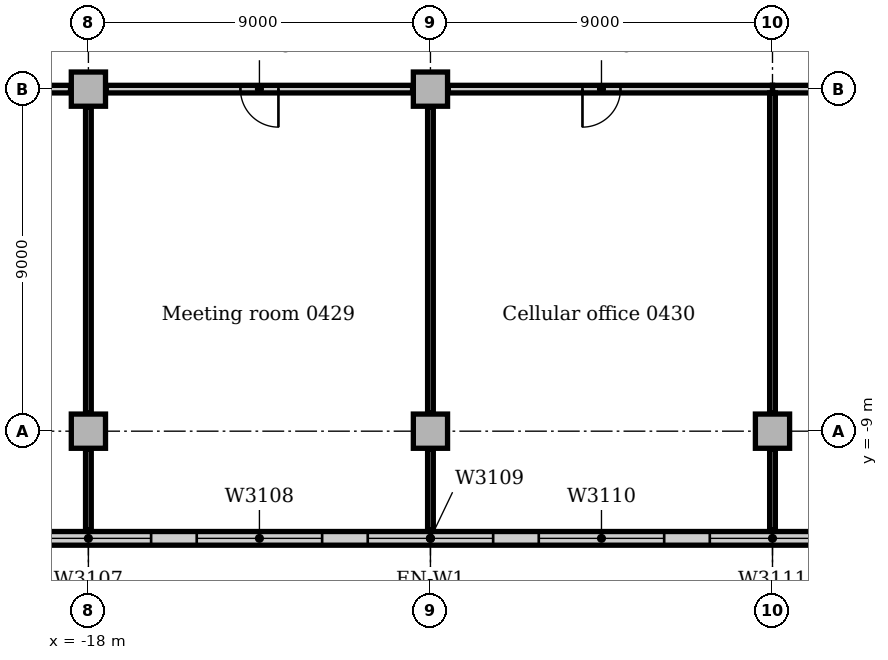
"""IFC4 building model, lengths in metres.
Left out: names, types, materials, properties, quantities, classifications, styles, units other than length and angle.
Written with IfcOpenShell. Run it as: python <this file> out.ifc"""

import sys

from ifc_helpers import new_model, si_unit, direction, frame, frame_2d, origin, origin_with_axes, origin_2d, place, context, subcontext, project, spatial, rectangle, extrude, element, fill, save


model = new_model("IFC4")
c1 = context("Model", 3, precision=1e-05, world=origin(), true_north=direction((0.0, 1.0)))
c2 = subcontext(c1, "Body", "Model", "MODEL_VIEW")
j1 = project(units=[si_unit("LENGTHUNIT", "METRE"), si_unit("PLANEANGLEUNIT", "RADIAN")], contexts=[c1])
p1 = place(None, origin())
s1 = spatial("IfcSite", under=j1, at=p1, CompositionType="ELEMENT")
p2 = place(p1, origin())
s2 = spatial("IfcBuilding", under=s1, at=p2, CompositionType="ELEMENT")
p3 = place(p2, frame((0.0, 0.0, 21.0)))
s3 = spatial("IfcBuildingStorey", under=s2, at=p3, CompositionType="ELEMENT", Elevation=21.0)
for number, where, z_axis, x_axis in (
    (1, (-18.0, -9.0, 0.0), (0.0, 0.0, 1.0), (1.0, 0.0, 0.0)),
    (2, (-18.0, 0.0, 0.0), (0.0, 0.0, 1.0), (1.0, 0.0, 0.0)),
    (3, (-9.0, -9.0, 0.0), (0.0, 0.0, 1.0), (1.0, 0.0, 0.0)),
    (4, (-9.0, 0.0, 0.0), (0.0, 0.0, 1.0), (1.0, 0.0, 0.0)),
    (5, (0.0, -9.0, 0.0), (0.0, 0.0, 1.0), (1.0, 0.0, 0.0)),
):
    element("IfcColumn", number, at=place(p3, frame(where, z_axis=z_axis, x_axis=x_axis)), inside=s3, PredefinedType="COLUMN", context=c2, shape_type="SweptSolid", body=[
        extrude(rectangle(XDim=0.9, YDim=0.9, at=origin_2d()), origin(), (0.0, 0.0, 1.0), 4.7),
    ])
p4 = place(p3, frame((-81.0, -11.82, 0.0), z_axis=(0.0, 0.0, 1.0), x_axis=(1.0, 0.0, 0.0)))
e6 = element("IfcWall", 6, at=p4, inside=s3, PredefinedType="STANDARD", context=c2, shape_type="SweptSolid", body=[
    extrude(rectangle(XDim=144.0, YDim=0.36, at=frame_2d((72.0, 0.0))), origin(), (0.0, 0.0, 1.0), 4.85),
])
p5 = place(p4, frame((2.85, 0.0, 0.9)))
e7 = element("IfcOpeningElement", 7, at=p5, cuts=e6, PredefinedType="OPENING", context=c2, shape_type="SweptSolid", body=[
    extrude(rectangle(XDim=3.3, YDim=2.4, at=frame_2d((1.65, 1.2))), frame((0.0, 0.19, 0.0), z_axis=(0.0, -1.0, 0.0), x_axis=(1.0, 0.0, 0.0)), (0.0, 0.0, 1.0), 0.38),
])
p6 = place(p4, frame((7.35, 0.0, 0.9)))
e8 = element("IfcOpeningElement", 8, at=p6, cuts=e6, PredefinedType="OPENING", context=c2, shape_type="SweptSolid", body=[
    extrude(rectangle(XDim=3.3, YDim=2.4, at=frame_2d((1.65, 1.2))), frame((0.0, 0.19, 0.0), z_axis=(0.0, -1.0, 0.0), x_axis=(1.0, 0.0, 0.0)), (0.0, 0.0, 1.0), 0.38),
])
p7 = place(p4, frame((11.85, 0.0, 0.9)))
e9 = element("IfcOpeningElement", 9, at=p7, cuts=e6, PredefinedType="OPENING", context=c2, shape_type="SweptSolid", body=[
    extrude(rectangle(XDim=3.3, YDim=2.4, at=frame_2d((1.65, 1.2))), frame((0.0, 0.19, 0.0), z_axis=(0.0, -1.0, 0.0), x_axis=(1.0, 0.0, 0.0)), (0.0, 0.0, 1.0), 0.38),
])
p8 = place(p4, frame((16.35, 0.0, 0.9)))
e10 = element("IfcOpeningElement", 10, at=p8, cuts=e6, PredefinedType="OPENING", context=c2, shape_type="SweptSolid", body=[
    extrude(rectangle(XDim=3.3, YDim=2.4, at=frame_2d((1.65, 1.2))), frame((0.0, 0.19, 0.0), z_axis=(0.0, -1.0, 0.0), x_axis=(1.0, 0.0, 0.0)), (0.0, 0.0, 1.0), 0.38),
])
p9 = place(p4, frame((20.85, 0.0, 0.9)))
e11 = element("IfcOpeningElement", 11, at=p9, cuts=e6, PredefinedType="OPENING", context=c2, shape_type="SweptSolid", body=[
    extrude(rectangle(XDim=3.3, YDim=2.4, at=frame_2d((1.65, 1.2))), frame((0.0, 0.19, 0.0), z_axis=(0.0, -1.0, 0.0), x_axis=(1.0, 0.0, 0.0)), (0.0, 0.0, 1.0), 0.38),
])
p10 = place(p4, frame((25.35, 0.0, 0.9)))
e12 = element("IfcOpeningElement", 12, at=p10, cuts=e6, PredefinedType="OPENING", context=c2, shape_type="SweptSolid", body=[
    extrude(rectangle(XDim=3.3, YDim=2.4, at=frame_2d((1.65, 1.2))), frame((0.0, 0.19, 0.0), z_axis=(0.0, -1.0, 0.0), x_axis=(1.0, 0.0, 0.0)), (0.0, 0.0, 1.0), 0.38),
])
p11 = place(p4, frame((29.85, 0.0, 0.9)))
e13 = element("IfcOpeningElement", 13, at=p11, cuts=e6, PredefinedType="OPENING", context=c2, shape_type="SweptSolid", body=[
    extrude(rectangle(XDim=3.3, YDim=2.4, at=frame_2d((1.65, 1.2))), frame((0.0, 0.19, 0.0), z_axis=(0.0, -1.0, 0.0), x_axis=(1.0, 0.0, 0.0)), (0.0, 0.0, 1.0), 0.38),
])
p12 = place(p4, frame((34.35, 0.0, 0.9)))
e14 = element("IfcOpeningElement", 14, at=p12, cuts=e6, PredefinedType="OPENING", context=c2, shape_type="SweptSolid", body=[
    extrude(rectangle(XDim=3.3, YDim=2.4, at=frame_2d((1.65, 1.2))), frame((0.0, 0.19, 0.0), z_axis=(0.0, -1.0, 0.0), x_axis=(1.0, 0.0, 0.0)), (0.0, 0.0, 1.0), 0.38),
])
p13 = place(p4, frame((38.85, 0.0, 0.9)))
e15 = element("IfcOpeningElement", 15, at=p13, cuts=e6, PredefinedType="OPENING", context=c2, shape_type="SweptSolid", body=[
    extrude(rectangle(XDim=3.3, YDim=2.4, at=frame_2d((1.65, 1.2))), frame((0.0, 0.19, 0.0), z_axis=(0.0, -1.0, 0.0), x_axis=(1.0, 0.0, 0.0)), (0.0, 0.0, 1.0), 0.38),
])
p14 = place(p4, frame((43.35, 0.0, 0.9)))
e16 = element("IfcOpeningElement", 16, at=p14, cuts=e6, PredefinedType="OPENING", context=c2, shape_type="SweptSolid", body=[
    extrude(rectangle(XDim=3.3, YDim=2.4, at=frame_2d((1.65, 1.2))), frame((0.0, 0.19, 0.0), z_axis=(0.0, -1.0, 0.0), x_axis=(1.0, 0.0, 0.0)), (0.0, 0.0, 1.0), 0.38),
])
p15 = place(p4, frame((47.85, 0.0, 0.9)))
e17 = element("IfcOpeningElement", 17, at=p15, cuts=e6, PredefinedType="OPENING", context=c2, shape_type="SweptSolid", body=[
    extrude(rectangle(XDim=3.3, YDim=2.4, at=frame_2d((1.65, 1.2))), frame((0.0, 0.19, 0.0), z_axis=(0.0, -1.0, 0.0), x_axis=(1.0, 0.0, 0.0)), (0.0, 0.0, 1.0), 0.38),
])
p16 = place(p4, frame((52.35, 0.0, 0.9)))
e18 = element("IfcOpeningElement", 18, at=p16, cuts=e6, PredefinedType="OPENING", context=c2, shape_type="SweptSolid", body=[
    extrude(rectangle(XDim=3.3, YDim=2.4, at=frame_2d((1.65, 1.2))), frame((0.0, 0.19, 0.0), z_axis=(0.0, -1.0, 0.0), x_axis=(1.0, 0.0, 0.0)), (0.0, 0.0, 1.0), 0.38),
])
p17 = place(p4, frame((56.85, 0.0, 0.9)))
e19 = element("IfcOpeningElement", 19, at=p17, cuts=e6, PredefinedType="OPENING", context=c2, shape_type="SweptSolid", body=[
    extrude(rectangle(XDim=3.3, YDim=2.4, at=frame_2d((1.65, 1.2))), frame((0.0, 0.19, 0.0), z_axis=(0.0, -1.0, 0.0), x_axis=(1.0, 0.0, 0.0)), (0.0, 0.0, 1.0), 0.38),
])
p18 = place(p4, frame((61.35, 0.0, 0.9)))
e20 = element("IfcOpeningElement", 20, at=p18, cuts=e6, PredefinedType="OPENING", context=c2, shape_type="SweptSolid", body=[
    extrude(rectangle(XDim=3.3, YDim=2.4, at=frame_2d((1.65, 1.2))), frame((0.0, 0.19, 0.0), z_axis=(0.0, -1.0, 0.0), x_axis=(1.0, 0.0, 0.0)), (0.0, 0.0, 1.0), 0.38),
])
p19 = place(p4, frame((65.85, 0.0, 0.9)))
e21 = element("IfcOpeningElement", 21, at=p19, cuts=e6, PredefinedType="OPENING", context=c2, shape_type="SweptSolid", body=[
    extrude(rectangle(XDim=3.3, YDim=2.4, at=frame_2d((1.65, 1.2))), frame((0.0, 0.19, 0.0), z_axis=(0.0, -1.0, 0.0), x_axis=(1.0, 0.0, 0.0)), (0.0, 0.0, 1.0), 0.38),
])
p20 = place(p4, frame((70.35, 0.0, 0.9)))
e22 = element("IfcOpeningElement", 22, at=p20, cuts=e6, PredefinedType="OPENING", context=c2, shape_type="SweptSolid", body=[
    extrude(rectangle(XDim=3.3, YDim=2.4, at=frame_2d((1.65, 1.2))), frame((0.0, 0.19, 0.0), z_axis=(0.0, -1.0, 0.0), x_axis=(1.0, 0.0, 0.0)), (0.0, 0.0, 1.0), 0.38),
])
p21 = place(p4, frame((74.85, 0.0, 0.9)))
e23 = element("IfcOpeningElement", 23, at=p21, cuts=e6, PredefinedType="OPENING", context=c2, shape_type="SweptSolid", body=[
    extrude(rectangle(XDim=3.3, YDim=2.4, at=frame_2d((1.65, 1.2))), frame((0.0, 0.19, 0.0), z_axis=(0.0, -1.0, 0.0), x_axis=(1.0, 0.0, 0.0)), (0.0, 0.0, 1.0), 0.38),
])
p22 = place(p4, frame((79.35, 0.0, 0.9)))
e24 = element("IfcOpeningElement", 24, at=p22, cuts=e6, PredefinedType="OPENING", context=c2, shape_type="SweptSolid", body=[
    extrude(rectangle(XDim=3.3, YDim=2.4, at=frame_2d((1.65, 1.2))), frame((0.0, 0.19, 0.0), z_axis=(0.0, -1.0, 0.0), x_axis=(1.0, 0.0, 0.0)), (0.0, 0.0, 1.0), 0.38),
])
p23 = place(p4, frame((83.85, 0.0, 0.9)))
e25 = element("IfcOpeningElement", 25, at=p23, cuts=e6, PredefinedType="OPENING", context=c2, shape_type="SweptSolid", body=[
    extrude(rectangle(XDim=3.3, YDim=2.4, at=frame_2d((1.65, 1.2))), frame((0.0, 0.19, 0.0), z_axis=(0.0, -1.0, 0.0), x_axis=(1.0, 0.0, 0.0)), (0.0, 0.0, 1.0), 0.38),
])
p24 = place(p4, frame((88.35, 0.0, 0.9)))
e26 = element("IfcOpeningElement", 26, at=p24, cuts=e6, PredefinedType="OPENING", context=c2, shape_type="SweptSolid", body=[
    extrude(rectangle(XDim=3.3, YDim=2.4, at=frame_2d((1.65, 1.2))), frame((0.0, 0.19, 0.0), z_axis=(0.0, -1.0, 0.0), x_axis=(1.0, 0.0, 0.0)), (0.0, 0.0, 1.0), 0.38),
])
p25 = place(p4, frame((92.85, 0.0, 0.9)))
e27 = element("IfcOpeningElement", 27, at=p25, cuts=e6, PredefinedType="OPENING", context=c2, shape_type="SweptSolid", body=[
    extrude(rectangle(XDim=3.3, YDim=2.4, at=frame_2d((1.65, 1.2))), frame((0.0, 0.19, 0.0), z_axis=(0.0, -1.0, 0.0), x_axis=(1.0, 0.0, 0.0)), (0.0, 0.0, 1.0), 0.38),
])
p26 = place(p4, frame((97.35, 0.0, 0.9)))
e28 = element("IfcOpeningElement", 28, at=p26, cuts=e6, PredefinedType="OPENING", context=c2, shape_type="SweptSolid", body=[
    extrude(rectangle(XDim=3.3, YDim=2.4, at=frame_2d((1.65, 1.2))), frame((0.0, 0.19, 0.0), z_axis=(0.0, -1.0, 0.0), x_axis=(1.0, 0.0, 0.0)), (0.0, 0.0, 1.0), 0.38),
])
p27 = place(p4, frame((101.85, 0.0, 0.9)))
e29 = element("IfcOpeningElement", 29, at=p27, cuts=e6, PredefinedType="OPENING", context=c2, shape_type="SweptSolid", body=[
    extrude(rectangle(XDim=3.3, YDim=2.4, at=frame_2d((1.65, 1.2))), frame((0.0, 0.19, 0.0), z_axis=(0.0, -1.0, 0.0), x_axis=(1.0, 0.0, 0.0)), (0.0, 0.0, 1.0), 0.38),
])
p28 = place(p4, frame((106.35, 0.0, 0.9)))
e30 = element("IfcOpeningElement", 30, at=p28, cuts=e6, PredefinedType="OPENING", context=c2, shape_type="SweptSolid", body=[
    extrude(rectangle(XDim=3.3, YDim=2.4, at=frame_2d((1.65, 1.2))), frame((0.0, 0.19, 0.0), z_axis=(0.0, -1.0, 0.0), x_axis=(1.0, 0.0, 0.0)), (0.0, 0.0, 1.0), 0.38),
])
p29 = place(p4, frame((110.85, 0.0, 0.9)))
e31 = element("IfcOpeningElement", 31, at=p29, cuts=e6, PredefinedType="OPENING", context=c2, shape_type="SweptSolid", body=[
    extrude(rectangle(XDim=3.3, YDim=2.4, at=frame_2d((1.65, 1.2))), frame((0.0, 0.19, 0.0), z_axis=(0.0, -1.0, 0.0), x_axis=(1.0, 0.0, 0.0)), (0.0, 0.0, 1.0), 0.38),
])
p30 = place(p4, frame((115.35, 0.0, 0.9)))
e32 = element("IfcOpeningElement", 32, at=p30, cuts=e6, PredefinedType="OPENING", context=c2, shape_type="SweptSolid", body=[
    extrude(rectangle(XDim=3.3, YDim=2.4, at=frame_2d((1.65, 1.2))), frame((0.0, 0.19, 0.0), z_axis=(0.0, -1.0, 0.0), x_axis=(1.0, 0.0, 0.0)), (0.0, 0.0, 1.0), 0.38),
])
p31 = place(p4, frame((119.85, 0.0, 0.9)))
e33 = element("IfcOpeningElement", 33, at=p31, cuts=e6, PredefinedType="OPENING", context=c2, shape_type="SweptSolid", body=[
    extrude(rectangle(XDim=3.3, YDim=2.4, at=frame_2d((1.65, 1.2))), frame((0.0, 0.19, 0.0), z_axis=(0.0, -1.0, 0.0), x_axis=(1.0, 0.0, 0.0)), (0.0, 0.0, 1.0), 0.38),
])
p32 = place(p4, frame((124.35, 0.0, 0.9)))
e34 = element("IfcOpeningElement", 34, at=p32, cuts=e6, PredefinedType="OPENING", context=c2, shape_type="SweptSolid", body=[
    extrude(rectangle(XDim=3.3, YDim=2.4, at=frame_2d((1.65, 1.2))), frame((0.0, 0.19, 0.0), z_axis=(0.0, -1.0, 0.0), x_axis=(1.0, 0.0, 0.0)), (0.0, 0.0, 1.0), 0.38),
])
p33 = place(p4, frame((128.85, 0.0, 0.9)))
e35 = element("IfcOpeningElement", 35, at=p33, cuts=e6, PredefinedType="OPENING", context=c2, shape_type="SweptSolid", body=[
    extrude(rectangle(XDim=3.3, YDim=2.4, at=frame_2d((1.65, 1.2))), frame((0.0, 0.19, 0.0), z_axis=(0.0, -1.0, 0.0), x_axis=(1.0, 0.0, 0.0)), (0.0, 0.0, 1.0), 0.38),
])
p34 = place(p4, frame((133.35, 0.0, 0.9)))
e36 = element("IfcOpeningElement", 36, at=p34, cuts=e6, PredefinedType="OPENING", context=c2, shape_type="SweptSolid", body=[
    extrude(rectangle(XDim=3.3, YDim=2.4, at=frame_2d((1.65, 1.2))), frame((0.0, 0.19, 0.0), z_axis=(0.0, -1.0, 0.0), x_axis=(1.0, 0.0, 0.0)), (0.0, 0.0, 1.0), 0.38),
])
p35 = place(p4, frame((137.85, 0.0, 0.9)))
e37 = element("IfcOpeningElement", 37, at=p35, cuts=e6, PredefinedType="OPENING", context=c2, shape_type="SweptSolid", body=[
    extrude(rectangle(XDim=3.3, YDim=2.4, at=frame_2d((1.65, 1.2))), frame((0.0, 0.19, 0.0), z_axis=(0.0, -1.0, 0.0), x_axis=(1.0, 0.0, 0.0)), (0.0, 0.0, 1.0), 0.38),
])
p36 = place(p3, origin_with_axes())
e38 = element("IfcWall", 38, at=p36, inside=s3, PredefinedType="PARTITIONING", context=c2, shape_type="SweptSolid", body=[
    extrude(rectangle(XDim=9.0, YDim=0.2, at=frame_2d((4.5, 0.0))), origin(), (0.0, 0.0, 1.0), 4.7),
])
p37 = place(p36, frame((4.3, 0.0, 0.0)))
e39 = element("IfcOpeningElement", 39, at=p37, cuts=e38, PredefinedType="OPENING", context=c2, shape_type="SweptSolid", body=[
    extrude(rectangle(XDim=1.0, YDim=2.1, at=frame_2d((0.5, 1.05))), frame((0.0, 0.11, 0.0), z_axis=(0.0, -1.0, 0.0), x_axis=(1.0, 0.0, 0.0)), (0.0, 0.0, 1.0), 0.22),
])
p38 = place(p3, frame((-27.0, 0.0, 0.0), z_axis=(0.0, 0.0, 1.0), x_axis=(1.0, 0.0, 0.0)))
e40 = element("IfcWall", 40, at=p38, inside=s3, PredefinedType="PARTITIONING", context=c2, shape_type="SweptSolid", body=[
    extrude(rectangle(XDim=8.53, YDim=0.2, at=frame_2d((4.265, 0.0))), origin(), (0.0, 0.0, 1.0), 4.7),
])
p39 = place(p38, frame((4.0, 0.0, 0.0)))
e41 = element("IfcOpeningElement", 41, at=p39, cuts=e40, PredefinedType="OPENING", context=c2, shape_type="SweptSolid", body=[
    extrude(rectangle(XDim=1.0, YDim=2.1, at=frame_2d((0.5, 1.05))), frame((0.0, 0.11, 0.0), z_axis=(0.0, -1.0, 0.0), x_axis=(1.0, 0.0, 0.0)), (0.0, 0.0, 1.0), 0.22),
])
p40 = place(p3, frame((-17.53, 0.0, 0.0), z_axis=(0.0, 0.0, 1.0), x_axis=(1.0, 0.0, 0.0)))
e42 = element("IfcWall", 42, at=p40, inside=s3, PredefinedType="PARTITIONING", context=c2, shape_type="SweptSolid", body=[
    extrude(rectangle(XDim=8.06, YDim=0.2, at=frame_2d((4.03, 0.0))), origin(), (0.0, 0.0, 1.0), 4.7),
])
p41 = place(p40, frame((3.53, 0.0, 0.0)))
e43 = element("IfcOpeningElement", 43, at=p41, cuts=e42, PredefinedType="OPENING", context=c2, shape_type="SweptSolid", body=[
    extrude(rectangle(XDim=1.0, YDim=2.1, at=frame_2d((0.5, 1.05))), frame((0.0, 0.11, 0.0), z_axis=(0.0, -1.0, 0.0), x_axis=(1.0, 0.0, 0.0)), (0.0, 0.0, 1.0), 0.22),
])
p42 = place(p3, frame((-8.53, 0.0, 0.0), z_axis=(0.0, 0.0, 1.0), x_axis=(1.0, 0.0, 0.0)))
e44 = element("IfcWall", 44, at=p42, inside=s3, PredefinedType="PARTITIONING", context=c2, shape_type="SweptSolid", body=[
    extrude(rectangle(XDim=8.53, YDim=0.2, at=frame_2d((4.265, 0.0))), origin(), (0.0, 0.0, 1.0), 4.7),
])
p43 = place(p42, frame((3.53, 0.0, 0.0)))
e45 = element("IfcOpeningElement", 45, at=p43, cuts=e44, PredefinedType="OPENING", context=c2, shape_type="SweptSolid", body=[
    extrude(rectangle(XDim=1.0, YDim=2.1, at=frame_2d((0.5, 1.05))), frame((0.0, 0.11, 0.0), z_axis=(0.0, -1.0, 0.0), x_axis=(1.0, 0.0, 0.0)), (0.0, 0.0, 1.0), 0.22),
])
p44 = place(p3, frame((-18.0, -11.6, 0.0), z_axis=(0.0, 0.0, 1.0), x_axis=(0.0, 1.0, 0.0)))
e46 = element("IfcWall", 46, at=p44, inside=s3, PredefinedType="PARTITIONING", context=c2, shape_type="SweptSolid", body=[
    extrude(rectangle(XDim=2.13, YDim=0.15, at=frame_2d((1.065, 0.0))), origin(), (0.0, 0.0, 1.0), 4.7),
])
p45 = place(p3, frame((-18.0, -8.53, 0.0), z_axis=(0.0, 0.0, 1.0), x_axis=(0.0, 1.0, 0.0)))
e47 = element("IfcWall", 47, at=p45, inside=s3, PredefinedType="PARTITIONING", context=c2, shape_type="SweptSolid", body=[
    extrude(rectangle(XDim=8.06, YDim=0.15, at=frame_2d((4.03, 0.0))), origin(), (0.0, 0.0, 1.0), 4.7),
])
p46 = place(p3, frame((-9.0, -11.6, 0.0), z_axis=(0.0, 0.0, 1.0), x_axis=(0.0, 1.0, 0.0)))
e48 = element("IfcWall", 48, at=p46, inside=s3, PredefinedType="PARTITIONING", context=c2, shape_type="SweptSolid", body=[
    extrude(rectangle(XDim=2.13, YDim=0.15, at=frame_2d((1.065, 0.0))), origin(), (0.0, 0.0, 1.0), 4.7),
])
p47 = place(p3, frame((-9.0, -8.53, 0.0), z_axis=(0.0, 0.0, 1.0), x_axis=(0.0, 1.0, 0.0)))
e49 = element("IfcWall", 49, at=p47, inside=s3, PredefinedType="PARTITIONING", context=c2, shape_type="SweptSolid", body=[
    extrude(rectangle(XDim=8.06, YDim=0.15, at=frame_2d((4.03, 0.0))), origin(), (0.0, 0.0, 1.0), 4.7),
])
p48 = place(p3, frame((0.0, -11.6, 0.0), z_axis=(0.0, 0.0, 1.0), x_axis=(0.0, 1.0, 0.0)))
e50 = element("IfcWall", 50, at=p48, inside=s3, PredefinedType="PARTITIONING", context=c2, shape_type="SweptSolid", body=[
    extrude(rectangle(XDim=2.13, YDim=0.15, at=frame_2d((1.065, 0.0))), origin(), (0.0, 0.0, 1.0), 4.7),
])
p49 = place(p3, frame((0.0, -8.53, 0.0), z_axis=(0.0, 0.0, 1.0), x_axis=(0.0, 1.0, 0.0)))
e51 = element("IfcWall", 51, at=p49, inside=s3, PredefinedType="PARTITIONING", context=c2, shape_type="SweptSolid", body=[
    extrude(rectangle(XDim=8.43, YDim=0.15, at=frame_2d((4.215, 0.0))), origin(), (0.0, 0.0, 1.0), 4.7),
])
p50 = place(p18, origin())
e52 = element("IfcWindow", 52, at=p50, inside=s3, PartitioningType="SINGLE_PANEL", PredefinedType="WINDOW", context=c2, shape_type="SweptSolid", body=[
    extrude(rectangle(XDim=3.3, YDim=2.4, at=frame_2d((1.65, 1.2))), frame((0.0, 0.13, 0.0), z_axis=(0.0, -1.0, 0.0), x_axis=(1.0, 0.0, 0.0)), (0.0, 0.0, 1.0), 0.06),
])
fill(e20, e52)
p51 = place(p19, origin())
e53 = element("IfcWindow", 53, at=p51, inside=s3, PartitioningType="SINGLE_PANEL", PredefinedType="WINDOW", context=c2, shape_type="SweptSolid", body=[
    extrude(rectangle(XDim=3.3, YDim=2.4, at=frame_2d((1.65, 1.2))), frame((0.0, 0.13, 0.0), z_axis=(0.0, -1.0, 0.0), x_axis=(1.0, 0.0, 0.0)), (0.0, 0.0, 1.0), 0.06),
])
fill(e21, e53)
p52 = place(p20, origin())
e54 = element("IfcWindow", 54, at=p52, inside=s3, PartitioningType="SINGLE_PANEL", PredefinedType="WINDOW", context=c2, shape_type="SweptSolid", body=[
    extrude(rectangle(XDim=3.3, YDim=2.4, at=frame_2d((1.65, 1.2))), frame((0.0, 0.13, 0.0), z_axis=(0.0, -1.0, 0.0), x_axis=(1.0, 0.0, 0.0)), (0.0, 0.0, 1.0), 0.06),
])
fill(e22, e54)
p53 = place(p21, origin())
e55 = element("IfcWindow", 55, at=p53, inside=s3, PartitioningType="SINGLE_PANEL", PredefinedType="WINDOW", context=c2, shape_type="SweptSolid", body=[
    extrude(rectangle(XDim=3.3, YDim=2.4, at=frame_2d((1.65, 1.2))), frame((0.0, 0.13, 0.0), z_axis=(0.0, -1.0, 0.0), x_axis=(1.0, 0.0, 0.0)), (0.0, 0.0, 1.0), 0.06),
])
fill(e23, e55)
p54 = place(p22, origin())
e56 = element("IfcWindow", 56, at=p54, inside=s3, PartitioningType="SINGLE_PANEL", PredefinedType="WINDOW", context=c2, shape_type="SweptSolid", body=[
    extrude(rectangle(XDim=3.3, YDim=2.4, at=frame_2d((1.65, 1.2))), frame((0.0, 0.13, 0.0), z_axis=(0.0, -1.0, 0.0), x_axis=(1.0, 0.0, 0.0)), (0.0, 0.0, 1.0), 0.06),
])
fill(e24, e56)
p55 = place(p41, frame((1.0, 0.0, 0.0), z_axis=(0.0, 0.0, 1.0), x_axis=(-1.0, 0.0, 0.0)))
e57 = element("IfcDoor", 57, at=p55, inside=s3, OperationType="SINGLE_SWING_LEFT", PredefinedType="DOOR", context=c2, shape_type="SweptSolid", body=[
    extrude(rectangle(XDim=1.0, YDim=2.1, at=frame_2d((0.5, 1.05))), frame((0.0, 0.025, 0.0), z_axis=(0.0, -1.0, 0.0), x_axis=(1.0, 0.0, 0.0)), (0.0, 0.0, 1.0), 0.05),
])
fill(e43, e57)
p56 = place(p43, frame((1.0, 0.0, 0.0), z_axis=(0.0, 0.0, 1.0), x_axis=(-1.0, 0.0, 0.0)))
e58 = element("IfcDoor", 58, at=p56, inside=s3, OperationType="SINGLE_SWING_RIGHT", PredefinedType="DOOR", context=c2, shape_type="SweptSolid", body=[
    extrude(rectangle(XDim=1.0, YDim=2.1, at=frame_2d((0.5, 1.05))), frame((0.0, 0.025, 0.0), z_axis=(0.0, -1.0, 0.0), x_axis=(1.0, 0.0, 0.0)), (0.0, 0.0, 1.0), 0.05),
])
fill(e45, e58)
save(model, sys.argv[1])
